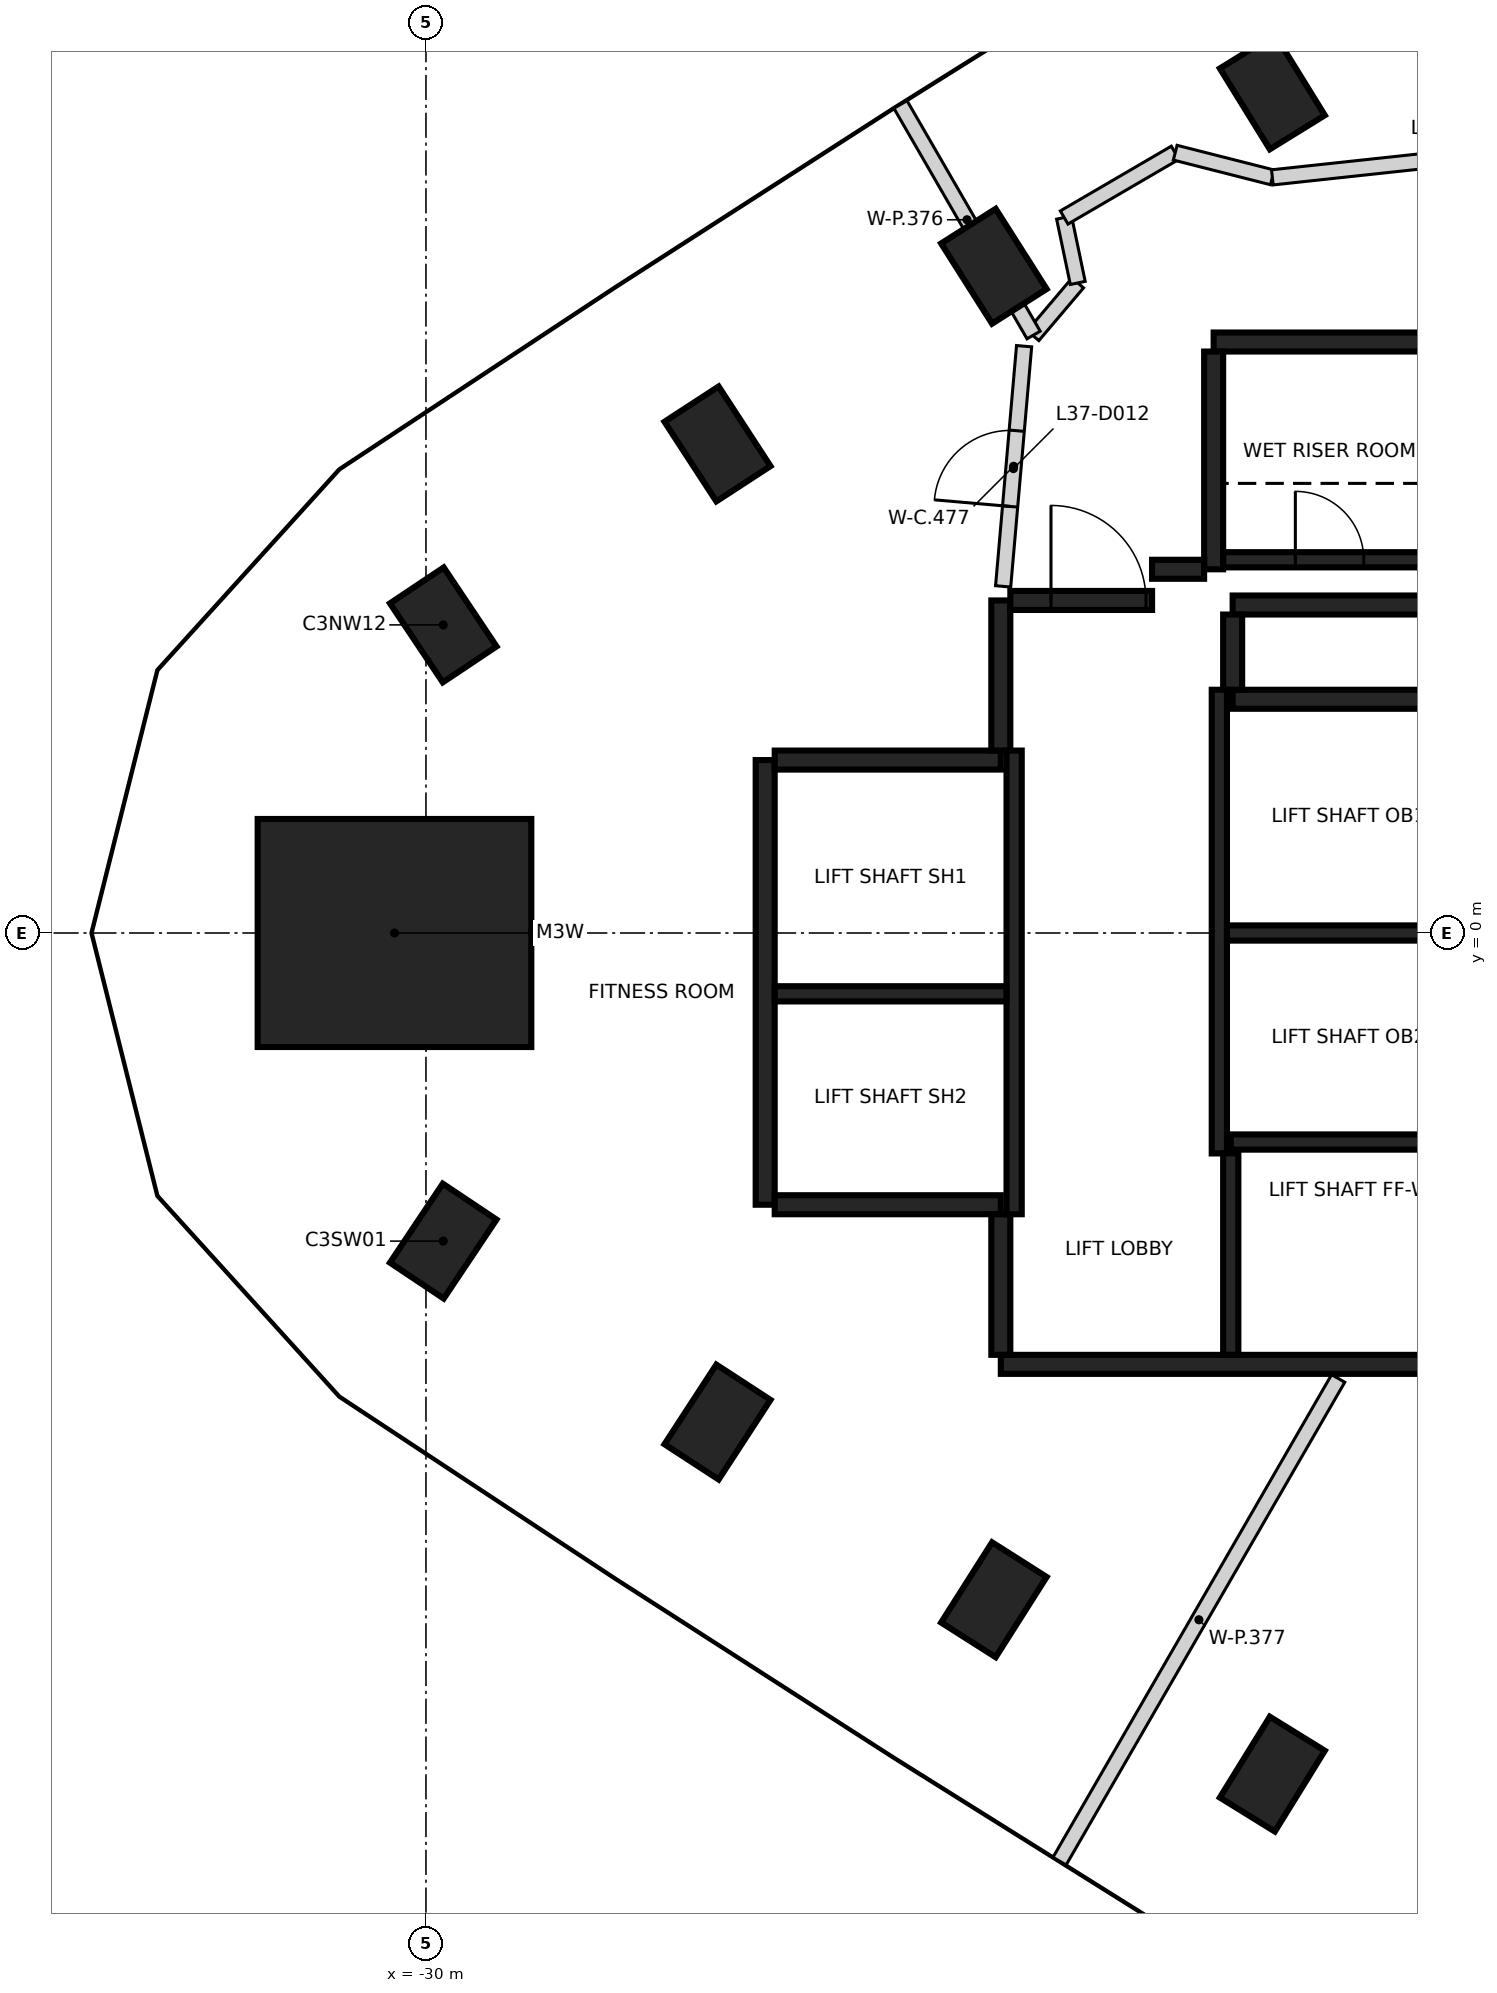
"""IFC4 building model, lengths in metres.
Left out: names, types, materials, properties, quantities, classifications, styles, units other than length and angle.
Written with IfcOpenShell. Run it as: python <this file> out.ifc"""

import sys

from ifc_helpers import new_model, si_unit, direction, frame, frame_2d, origin, origin_2d, place, context, subcontext, project, spatial, rectangle, extrude, element, fill, save


model = new_model("IFC4")
c1 = context("Model", 3, precision=1e-05, world=origin(), true_north=direction((0.0, 1.0)))
c2 = subcontext(c1, "Body", "Model", "MODEL_VIEW")
j1 = project(units=[si_unit("LENGTHUNIT", "METRE"), si_unit("PLANEANGLEUNIT", "RADIAN")], contexts=[c1])
p1 = place(None, origin())
s1 = spatial("IfcSite", under=j1, at=p1, CompositionType="ELEMENT")
p2 = place(p1, origin())
s2 = spatial("IfcBuilding", under=s1, at=p2, CompositionType="ELEMENT")
p3 = place(p2, frame((0.0, 0.0, 150.4)))
s3 = spatial("IfcBuildingStorey", under=s2, at=p3, CompositionType="ELEMENT", Elevation=150.4)
for number, where, z_axis, x_axis in (
    (1, (-18.865, 11.066, -0.4), (0.0, 0.0, 1.0), (-0.526, 0.851, 0.0)),
    (2, (-22.529, 8.772, -0.4), (0.0, 0.0, 1.0), (-0.536, 0.844, 0.0)),
    (3, (-26.165, 6.434, -0.4), (0.0, 0.0, 1.0), (-0.546, 0.838, 0.0)),
    (4, (-29.773, 4.053, -0.4), (0.0, 0.0, 1.0), (-0.556, 0.831, 0.0)),
    (5, (-29.773, -4.053, -0.4), (0.0, 0.0, 1.0), (0.556, 0.831, 0.0)),
    (6, (-26.165, -6.434, -0.4), (0.0, 0.0, 1.0), (0.546, 0.838, 0.0)),
    (7, (-22.529, -8.772, -0.4), (0.0, 0.0, 1.0), (0.536, 0.844, 0.0)),
    (8, (-18.865, -11.066, -0.4), (0.0, 0.0, 1.0), (0.526, 0.851, 0.0)),
):
    element("IfcColumn", number, at=place(p3, frame(where, z_axis=z_axis, x_axis=x_axis)), inside=s3, PredefinedType="COLUMN", context=c2, shape_type="SweptSolid", body=[
        extrude(rectangle(XDim=1.25, YDim=0.85, at=origin_2d()), origin(), (0.0, 0.0, 1.0), 3.6),
    ])
p4 = place(p3, frame((-30.414, 0.0, -0.4), z_axis=(0.0, 0.0, 1.0), x_axis=(1.0, 0.0, 0.0)))
e9 = element("IfcColumn", 9, at=p4, inside=s3, PredefinedType="COLUMN", context=c2, shape_type="SweptSolid", body=[
    extrude(rectangle(XDim=3.6, YDim=3.0, at=origin_2d()), origin(), (0.0, 0.0, 1.0), 3.6),
])
p5 = place(p3, frame((-16.187, -5.675, 0.0), z_axis=(0.0, 0.0, 1.0), x_axis=(-1.0, 0.0, 0.0)))
e10 = element("IfcWall", 10, at=p5, inside=s3, PredefinedType="SHEAR", context=c2, shape_type="SweptSolid", body=[
    extrude(rectangle(XDim=6.25, YDim=0.25, at=frame_2d((3.125, 0.0))), origin(), (0.0, 0.0, 1.0), 3.2),
])
p6 = place(p3, frame((-25.537, -3.575, 0.0), z_axis=(0.0, 0.0, 1.0), x_axis=(0.0, 1.0, 0.0)))
e11 = element("IfcWall", 11, at=p6, inside=s3, PredefinedType="SHEAR", context=c2, shape_type="SweptSolid", body=[
    extrude(rectangle(XDim=5.85, YDim=0.25, at=frame_2d((2.925, 0.0))), origin(), (0.0, 0.0, 1.0), 3.2),
])
p7 = place(p3, frame((-19.387, 3.075, 0.0), z_axis=(0.0, 0.0, 1.0), x_axis=(1.0, 0.0, 0.0)))
e12 = element("IfcWall", 12, at=p7, inside=s3, PredefinedType="SHEAR", context=c2, shape_type="SweptSolid", body=[
    extrude(rectangle(XDim=3.2, YDim=0.25, at=frame_2d((1.6, 0.0))), origin(), (0.0, 0.0, 1.0), 3.2),
])
for number, where, z_axis, x_axis in (
    (13, (-22.437, -3.575, 0.0), (0.0, 0.0, 1.0), (-1.0, 0.0, 0.0)),
    (14, (-25.412, 2.275, 0.0), (0.0, 0.0, 1.0), (1.0, 0.0, 0.0)),
):
    element("IfcWall", number, at=place(p3, frame(where, z_axis=z_axis, x_axis=x_axis)), inside=s3, PredefinedType="SHEAR", context=c2, shape_type="SweptSolid", body=[
        extrude(rectangle(XDim=2.975, YDim=0.25, at=frame_2d((1.487, 0.0))), origin(), (0.0, 0.0, 1.0), 3.2),
    ])
p8 = place(p3, frame((-19.637, 7.775, 0.0), z_axis=(0.0, 0.0, 1.0), x_axis=(1.0, 0.0, 0.0)))
e15 = element("IfcWall", 15, at=p8, inside=s3, PredefinedType="SHEAR", context=c2, shape_type="SweptSolid", body=[
    extrude(rectangle(XDim=3.05, YDim=0.25, at=frame_2d((1.525, 0.0))), origin(), (0.0, 0.0, 1.0), 3.2),
])
p9 = place(p3, frame((-19.637, 4.785, 0.0), z_axis=(0.0, 0.0, 1.0), x_axis=(0.0, 1.0, 0.0)))
e16 = element("IfcWall", 16, at=p9, inside=s3, PredefinedType="SHEAR", context=c2, shape_type="SweptSolid", body=[
    extrude(rectangle(XDim=2.865, YDim=0.25, at=frame_2d((1.432, 0.0))), origin(), (0.0, 0.0, 1.0), 3.2),
])
p10 = place(p3, frame((-16.302, 4.315, 0.0), z_axis=(0.0, 0.0, 1.0), x_axis=(-1.0, 0.0, 0.0)))
e17 = element("IfcWall", 17, at=p10, inside=s3, PredefinedType="SHEAR", context=c2, shape_type="SweptSolid", body=[
    extrude(rectangle(XDim=3.085, YDim=0.25, at=frame_2d((1.542, 0.0))), origin(), (0.0, 0.0, 1.0), 3.2),
])
p11 = place(p3, frame((-22.437, 2.4, 0.0), z_axis=(0.0, 0.0, 1.0), x_axis=(0.0, 1.0, 0.0)))
e18 = element("IfcWall", 18, at=p11, inside=s3, PredefinedType="SHEAR", context=c2, shape_type="SweptSolid", body=[
    extrude(rectangle(XDim=1.975, YDim=0.25, at=frame_2d((0.987, 0.0))), origin(), (0.0, 0.0, 1.0), 3.2),
])
p12 = place(p3, frame((-22.437, -5.55, 0.0), z_axis=(0.0, 0.0, 1.0), x_axis=(0.0, 1.0, 0.0)))
e19 = element("IfcWall", 19, at=p12, inside=s3, PredefinedType="SHEAR", context=c2, shape_type="SweptSolid", body=[
    extrude(rectangle(XDim=1.849, YDim=0.25, at=frame_2d((0.925, 0.0))), origin(), (0.0, 0.0, 1.0), 3.2),
])
p13 = place(p3, frame((-22.312, 4.375, 0.0), z_axis=(0.0, 0.0, 1.0), x_axis=(1.0, 0.0, 0.0)))
e20 = element("IfcWall", 20, at=p13, inside=s3, PredefinedType="SHEAR", context=c2, shape_type="SweptSolid", body=[
    extrude(rectangle(XDim=1.865, YDim=0.25, at=frame_2d((0.932, 0.0))), origin(), (0.0, 0.0, 1.0), 3.2),
])
p14 = place(p13, frame((0.535, 0.0, 0.0)))
e21 = element("IfcOpeningElement", 21, at=p14, cuts=e20, PredefinedType="OPENING", context=c2, shape_type="SweptSolid", body=[
    extrude(rectangle(XDim=1.25, YDim=2.1, at=frame_2d((0.625, 1.05))), frame((0.0, 0.135, 0.0), z_axis=(0.0, -1.0, 0.0), x_axis=(1.0, 0.0, 0.0)), (0.0, 0.0, 1.0), 0.27),
])
p15 = place(p3, frame((-19.387, 4.19, 0.0), z_axis=(0.0, 0.0, 1.0), x_axis=(0.0, -1.0, 0.0)))
e22 = element("IfcWall", 22, at=p15, inside=s3, PredefinedType="SHEAR", context=c2, shape_type="SweptSolid", body=[
    extrude(rectangle(XDim=0.989, YDim=0.25, at=frame_2d((0.495, 0.0))), origin(), (0.0, 0.0, 1.0), 3.2),
])
p16 = place(p3, frame((-20.447, 4.785, 0.0), z_axis=(0.0, 0.0, 1.0), x_axis=(1.0, 0.0, 0.0)))
e23 = element("IfcWall", 23, at=p16, inside=s3, PredefinedType="SHEAR", context=c2, shape_type="SweptSolid", body=[
    extrude(rectangle(XDim=0.685, YDim=0.25, at=frame_2d((0.342, 0.0))), origin(), (0.0, 0.0, 1.0), 3.2),
])
for number, where, z_axis, x_axis in (
    (24, (-19.562, -2.9, 0.0), (0.0, 0.0, 1.0), (0.0, 1.0, 0.0)),
    (25, (-22.262, 2.4, 0.0), (0.0, 0.0, 1.0), (0.0, -1.0, 0.0)),
):
    element("IfcWall", number, at=place(p3, frame(where, z_axis=z_axis, x_axis=x_axis)), inside=s3, PredefinedType="SHEAR", context=c2, shape_type="SweptSolid", body=[
        extrude(rectangle(XDim=6.1, YDim=0.2, at=frame_2d((3.05, 0.0))), origin(), (0.0, 0.0, 1.0), 3.2),
    ])
p17 = place(p3, frame((-16.263, 0.0, 0.0), z_axis=(0.0, 0.0, 1.0), x_axis=(-1.0, 0.0, 0.0)))
e26 = element("IfcWall", 26, at=p17, inside=s3, PredefinedType="SHEAR", context=c2, shape_type="SweptSolid", body=[
    extrude(rectangle(XDim=3.198, YDim=0.2, at=frame_2d((1.599, 0.0))), origin(), (0.0, 0.0, 1.0), 3.2),
])
p18 = place(p3, frame((-22.363, -0.8, 0.0), z_axis=(0.0, 0.0, 1.0), x_axis=(-1.0, 0.0, 0.0)))
e27 = element("IfcWall", 27, at=p18, inside=s3, PredefinedType="SHEAR", context=c2, shape_type="SweptSolid", body=[
    extrude(rectangle(XDim=3.048, YDim=0.2, at=frame_2d((1.524, 0.0))), origin(), (0.0, 0.0, 1.0), 3.2),
])
p19 = place(p3, frame((-19.511, 4.91, 0.0), z_axis=(0.0, 0.0, 1.0), x_axis=(1.0, 0.0, 0.0)))
e28 = element("IfcWall", 28, at=p19, inside=s3, PredefinedType="SHEAR", context=c2, shape_type="SweptSolid", body=[
    extrude(rectangle(XDim=2.798, YDim=0.2, at=frame_2d((1.399, 0.0))), origin(), (0.0, 0.0, 1.0), 3.2),
])
p20 = place(p19, frame((0.949, 0.0, 0.0)))
e29 = element("IfcOpeningElement", 29, at=p20, cuts=e28, PredefinedType="OPENING", context=c2, shape_type="SweptSolid", body=[
    extrude(rectangle(XDim=0.9, YDim=2.1, at=frame_2d((0.45, 1.05))), frame((0.0, 0.11, 0.0), z_axis=(0.0, -1.0, 0.0), x_axis=(1.0, 0.0, 0.0)), (0.0, 0.0, 1.0), 0.22),
])
p21 = place(p3, frame((-19.412, -2.75, 0.0), z_axis=(0.0, 0.0, 1.0), x_axis=(1.0, 0.0, 0.0)))
e30 = element("IfcWall", 30, at=p21, inside=s3, PredefinedType="SHEAR", context=c2, shape_type="SweptSolid", body=[
    extrude(rectangle(XDim=3.1, YDim=0.2, at=frame_2d((1.55, 0.0))), origin(), (0.0, 0.0, 1.0), 3.2),
])
p22 = place(p3, frame((-19.412, -5.549, 0.0), z_axis=(0.0, 0.0, 1.0), x_axis=(0.0, 1.0, 0.0)))
e31 = element("IfcWall", 31, at=p22, inside=s3, PredefinedType="SHEAR", context=c2, shape_type="SweptSolid", body=[
    extrude(rectangle(XDim=2.651, YDim=0.2, at=frame_2d((1.325, 0.0))), origin(), (0.0, 0.0, 1.0), 3.2),
])
p23 = place(p3, frame((-22.407, 4.56, 0.0), z_axis=(0.0, 0.0, 1.0), x_axis=(0.086898645684, 0.996217157741, 0.0)))
e32 = element("IfcWall", 32, at=p23, inside=s3, PredefinedType="PARTITIONING", context=c2, shape_type="SweptSolid", body=[
    extrude(rectangle(XDim=3.172, YDim=0.2, at=frame_2d((1.586, 0.0))), origin(), (0.0, 0.0, 1.0), 3.2),
])
p24 = place(p23, frame((1.056, 0.0, 0.0)))
e33 = element("IfcOpeningElement", 33, at=p24, cuts=e32, PredefinedType="OPENING", context=c2, shape_type="SweptSolid", body=[
    extrude(rectangle(XDim=1.0, YDim=2.1, at=frame_2d((0.5, 1.05))), frame((0.0, 0.11, 0.0), z_axis=(0.0, -1.0, 0.0), x_axis=(1.0, 0.0, 0.0)), (0.0, 0.0, 1.0), 0.22),
])
p25 = place(p3, frame((-22.013, 7.858, 0.0), z_axis=(0.0, 0.0, 1.0), x_axis=(0.646315152402, 0.763070588986, 0.0)))
e34 = element("IfcWall", 34, at=p25, inside=s3, PredefinedType="PARTITIONING", context=c2, shape_type="SweptSolid", body=[
    extrude(rectangle(XDim=0.91, YDim=0.2, at=frame_2d((0.455, 0.0))), origin(), (0.0, 0.0, 1.0), 3.2),
])
p26 = place(p3, frame((-21.605, 9.412, 0.0), z_axis=(0.0, 0.0, 1.0), x_axis=(0.204764111512, -0.978811349871, 0.0)))
e35 = element("IfcWall", 35, at=p26, inside=s3, PredefinedType="PARTITIONING", context=c2, shape_type="SweptSolid", body=[
    extrude(rectangle(XDim=0.879, YDim=0.2, at=frame_2d((0.439, 0.0))), origin(), (0.0, 0.0, 1.0), 2.3),
])
p27 = place(p3, frame((-21.604, 9.413, 0.0), z_axis=(0.0, 0.0, 1.0), x_axis=(0.863736988548, 0.503942868402, 0.0)))
e36 = element("IfcWall", 36, at=p27, inside=s3, PredefinedType="PARTITIONING", context=c2, shape_type="SweptSolid", body=[
    extrude(rectangle(XDim=1.69, YDim=0.2, at=frame_2d((0.845, 0.0))), origin(), (0.0, 0.0, 1.0), 2.3),
])
p28 = place(p3, frame((-20.143, 10.266, 0.0), z_axis=(0.0, 0.0, 1.0), x_axis=(0.969121308325, -0.246584447505, 0.0)))
e37 = element("IfcWall", 37, at=p28, inside=s3, PredefinedType="PARTITIONING", context=c2, shape_type="SweptSolid", body=[
    extrude(rectangle(XDim=1.319, YDim=0.2, at=frame_2d((0.659, 0.0))), origin(), (0.0, 0.0, 1.0), 2.3),
])
p29 = place(p3, frame((-18.865, 9.941, 0.0), z_axis=(0.0, 0.0, 1.0), x_axis=(0.99423123086, 0.107257911519, 0.0)))
e38 = element("IfcWall", 38, at=p29, inside=s3, PredefinedType="PARTITIONING", context=c2, shape_type="SweptSolid", body=[
    extrude(rectangle(XDim=2.854, YDim=0.2, at=frame_2d((1.427, 0.0))), origin(), (0.0, 0.0, 1.0), 3.2),
])
p30 = place(p3, frame((-23.758, 10.9, 0.0), z_axis=(0.0, 0.0, 1.0), x_axis=(0.500112665219, -0.865960346718, 0.0)))
e39 = element("IfcWall", 39, at=p30, inside=s3, PredefinedType="PARTITIONING", context=c2, shape_type="SweptSolid", body=[
    extrude(rectangle(XDim=3.502, YDim=0.2, at=frame_2d((1.751, 0.0))), origin(), (0.0, 0.0, 1.0), 3.2),
])
p31 = place(p3, frame((-21.664, -12.21, 0.0), z_axis=(0.0, 0.0, 1.0), x_axis=(0.499938621367, 0.866060837855, 0.0)))
e40 = element("IfcWall", 40, at=p31, inside=s3, PredefinedType="PARTITIONING", context=c2, shape_type="SweptSolid", body=[
    extrude(rectangle(XDim=7.333, YDim=0.2, at=frame_2d((3.666, 0.0))), origin(), (0.0, 0.0, 1.0), 2.3),
])
p32 = place(p14, origin())
e41 = element("IfcDoor", 41, at=p32, inside=s3, OperationType="SINGLE_SWING_LEFT", PredefinedType="DOOR", context=c2, shape_type="SweptSolid", body=[
    extrude(rectangle(XDim=1.25, YDim=2.1, at=frame_2d((0.625, 1.05))), frame((0.0, 0.025, 0.0), z_axis=(0.0, -1.0, 0.0), x_axis=(1.0, 0.0, 0.0)), (0.0, 0.0, 1.0), 0.05),
])
fill(e21, e41)
p33 = place(p20, origin())
e42 = element("IfcDoor", 42, at=p33, inside=s3, OperationType="SINGLE_SWING_RIGHT", PredefinedType="DOOR", context=c2, shape_type="SweptSolid", body=[
    extrude(rectangle(XDim=0.9, YDim=2.1, at=frame_2d((0.45, 1.05))), frame((0.0, 0.025, 0.0), z_axis=(0.0, -1.0, 0.0), x_axis=(1.0, 0.0, 0.0)), (0.0, 0.0, 1.0), 0.05),
])
fill(e29, e42)
p34 = place(p24, origin())
e43 = element("IfcDoor", 43, at=p34, inside=s3, OperationType="SINGLE_SWING_LEFT", PredefinedType="DOOR", context=c2, shape_type="SweptSolid", body=[
    extrude(rectangle(XDim=1.0, YDim=2.1, at=frame_2d((0.5, 1.05))), frame((0.0, 0.025, 0.0), z_axis=(0.0, -1.0, 0.0), x_axis=(1.0, 0.0, 0.0)), (0.0, 0.0, 1.0), 0.05),
])
fill(e33, e43)
save(model, sys.argv[1])
